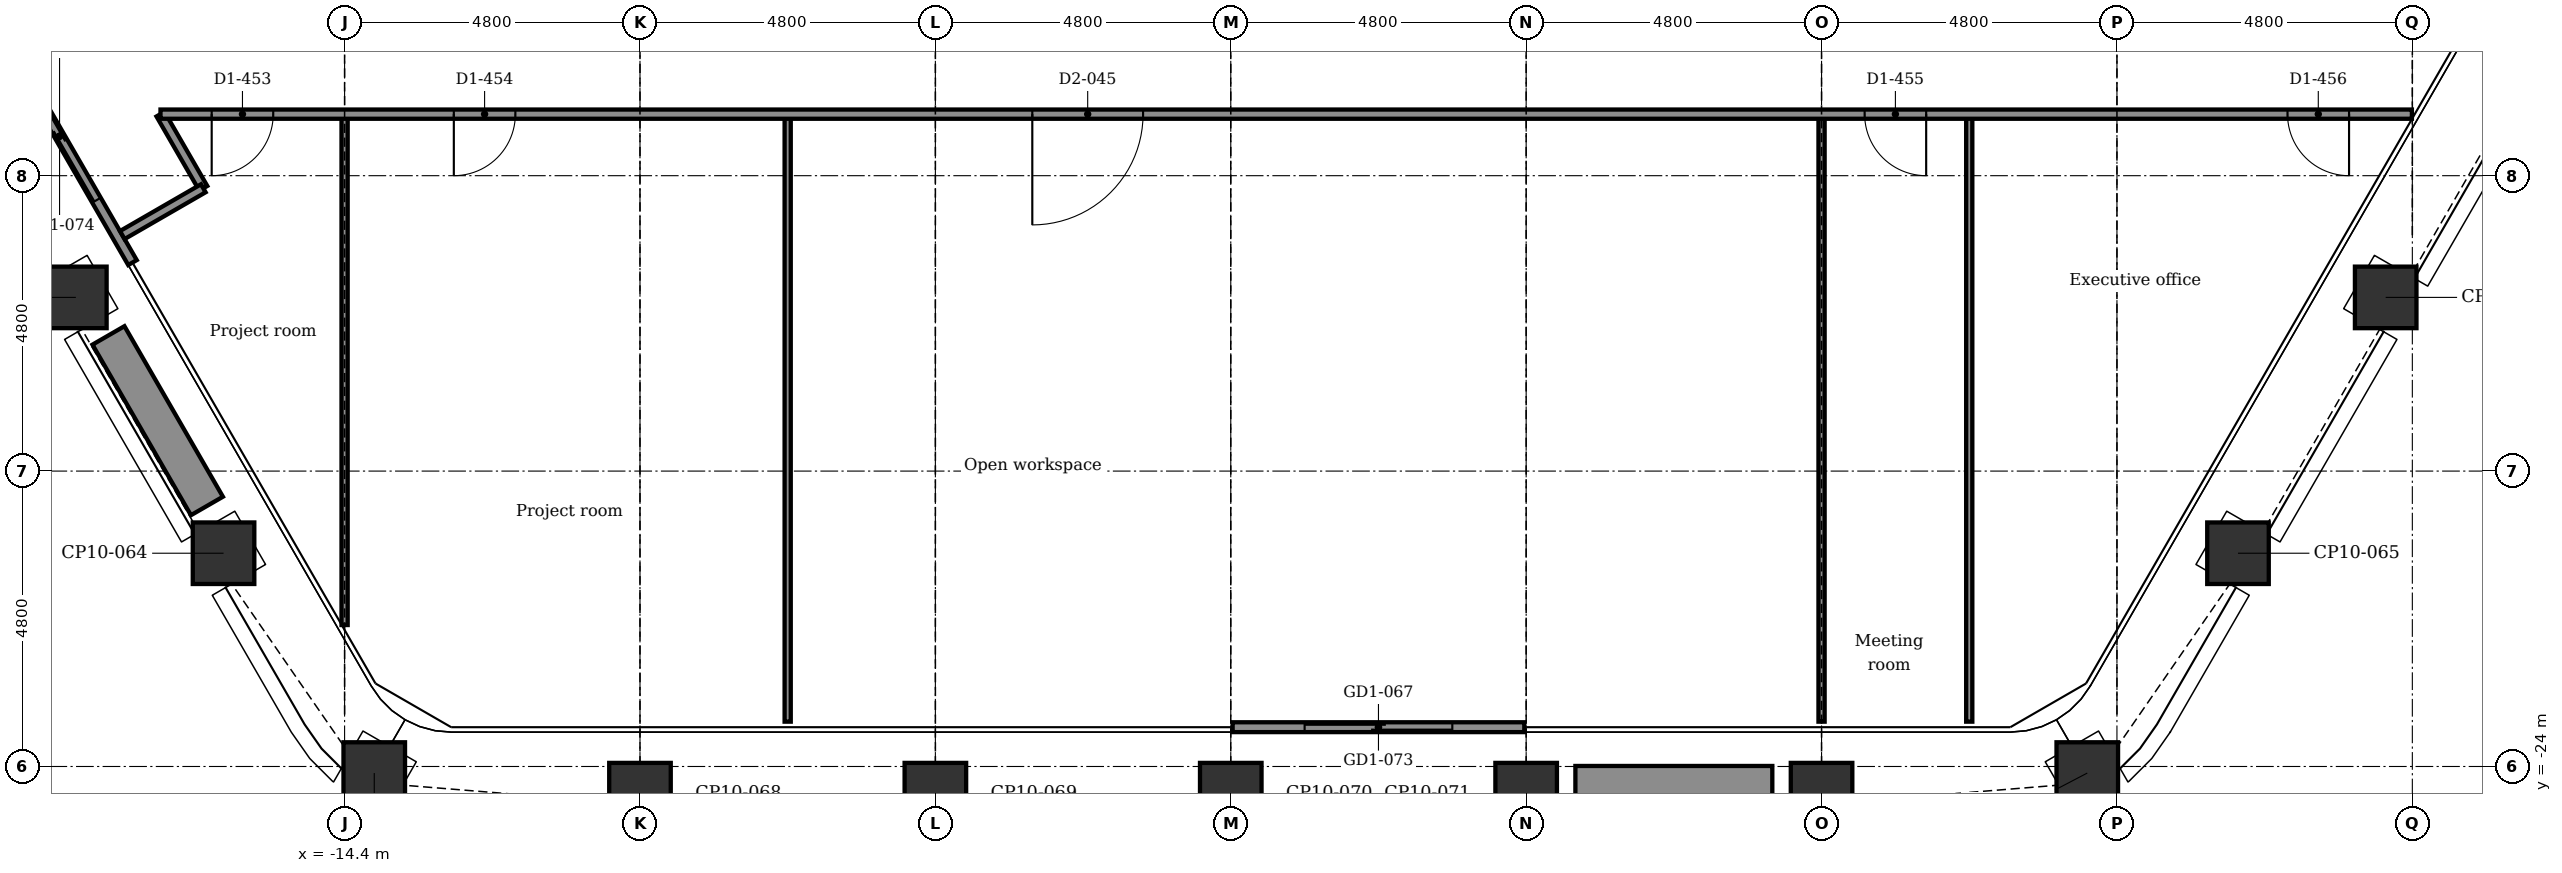
"""IFC4 building model, lengths in metres.
Left out: names, types, materials, properties, quantities, classifications, styles, units other than length and angle.
Written with IfcOpenShell. Run it as: python <this file> out.ifc"""

import sys

from ifc_helpers import new_model, si_unit, direction, frame, frame_2d, origin, origin_2d, place, context, subcontext, project, spatial, rectangle, extrude, element, fill, save


model = new_model("IFC4")
c1 = context("Model", 3, precision=1e-05, world=origin(), true_north=direction((0.0, 1.0)))
c2 = subcontext(c1, "Body", "Model", "MODEL_VIEW")
j1 = project(units=[si_unit("LENGTHUNIT", "METRE"), si_unit("PLANEANGLEUNIT", "RADIAN")], contexts=[c1])
p1 = place(None, origin())
s1 = spatial("IfcSite", under=j1, at=p1, CompositionType="ELEMENT")
p2 = place(p1, origin())
s2 = spatial("IfcBuilding", under=s1, at=p2, CompositionType="ELEMENT")
p3 = place(p2, frame((0.0, 0.0, 154.4)))
s3 = spatial("IfcBuildingStorey", under=s2, at=p3, CompositionType="ELEMENT", Elevation=154.4)
for number, where, z_axis, x_axis in (
    (1, (18.767, -16.378, -0.15), (0.0, 0.0, 1.0), (0.5, 0.866, 0.0)),
    (2, (16.367, -20.535, -0.15), (0.0, 0.0, 1.0), (0.5, 0.866, 0.0)),
    (3, (13.918, -24.107, -0.15), (0.0, 0.0, 1.0), (0.866, 0.5, 0.0)),
    (4, (9.6, -24.442, -0.15), (0.0, 0.0, 1.0), (1.0, 0.0, 0.0)),
    (5, (4.8, -24.442, -0.15), (0.0, 0.0, 1.0), (1.0, 0.0, 0.0)),
    (6, (0.0, -24.442, -0.15), (0.0, 0.0, 1.0), (1.0, 0.0, 0.0)),
    (7, (-4.8, -24.442, -0.15), (0.0, 0.0, 1.0), (1.0, 0.0, 0.0)),
    (8, (-9.6, -24.442, -0.15), (0.0, 0.0, 1.0), (1.0, 0.0, 0.0)),
    (9, (-13.918, -24.107, -0.15), (0.0, 0.0, 1.0), (0.5, 0.866, 0.0)),
    (10, (-16.367, -20.535, -0.15), (0.0, 0.0, 1.0), (0.866, 0.5, 0.0)),
    (11, (-18.767, -16.378, -0.15), (0.0, 0.0, 1.0), (0.866, 0.5, 0.0)),
):
    element("IfcColumn", number, at=place(p3, frame(where, z_axis=z_axis, x_axis=x_axis)), inside=s3, PredefinedType="COLUMN", context=c2, shape_type="SweptSolid", body=[
        extrude(rectangle(XDim=1.0, YDim=1.0, at=origin_2d()), origin(), (0.0, 0.0, 1.0), 3.9),
    ])
p4 = place(p3, frame((4.77, -23.362, 0.0), z_axis=(0.0, 0.0, 1.0), x_axis=(-1.0, 0.0, 0.0)))
e12 = element("IfcWall", 12, at=p4, inside=s3, PredefinedType="PARTITIONING", context=c2, shape_type="SweptSolid", body=[
    extrude(rectangle(XDim=4.74, YDim=0.16, at=frame_2d((2.37, 0.0))), origin(), (0.0, 0.0, 1.0), 3.75),
])
p5 = place(p4, frame((1.17, 0.0, 0.0)))
e13 = element("IfcOpeningElement", 13, at=p5, cuts=e12, PredefinedType="OPENING", context=c2, shape_type="SweptSolid", body=[
    extrude(rectangle(XDim=2.4, YDim=2.4, at=frame_2d((1.2, 1.2))), frame((0.0, 0.09, 0.0), z_axis=(0.0, -1.0, 0.0), x_axis=(1.0, 0.0, 0.0)), (0.0, 0.0, 1.0), 0.18),
])
p6 = place(p3, frame((-17.847, -15.812, 0.0), z_axis=(0.0, 0.0, 1.0), x_axis=(-0.5000167099, 0.866015756104, 0.0)))
e14 = element("IfcWall", 14, at=p6, inside=s3, PredefinedType="PARTITIONING", context=c2, shape_type="SweptSolid", body=[
    extrude(rectangle(XDim=4.74, YDim=0.16, at=frame_2d((2.37, 0.0))), origin(), (0.0, 0.0, 1.0), 3.75),
])
p7 = place(p6, frame((1.17, 0.0, 0.0)))
e15 = element("IfcOpeningElement", 15, at=p7, cuts=e14, PredefinedType="OPENING", context=c2, shape_type="SweptSolid", body=[
    extrude(rectangle(XDim=2.4, YDim=2.4, at=frame_2d((1.2, 1.2))), frame((0.0, 0.09, 0.0), z_axis=(0.0, -1.0, 0.0), x_axis=(1.0, 0.0, 0.0)), (0.0, 0.0, 1.0), 0.18),
])
for number, where, z_axis, x_axis in (
    (16, (8.8, -24.292, 0.0), (0.0, 0.0, 1.0), (-1.0, 0.0, 0.0)),
    (17, (-16.637, -19.767, 0.0), (0.0, 0.0, 1.0), (-0.5, 0.866, 0.0)),
):
    element("IfcWall", number, at=place(p3, frame(where, z_axis=z_axis, x_axis=x_axis)), inside=s3, PredefinedType="USERDEFINED", context=c2, shape_type="SweptSolid", body=[
        extrude(rectangle(XDim=3.2, YDim=0.6, at=frame_2d((1.6, 0.0))), origin(), (0.0, 0.0, 1.0), 0.7),
    ])
p8 = place(p3, frame((12.0, -23.271, 0.0), z_axis=(0.0, 0.0, 1.0), x_axis=(0.0, 1.0, 0.0)))
e18 = element("IfcWall", 18, at=p8, inside=s3, PredefinedType="PARTITIONING", context=c2, shape_type="SweptSolid", body=[
    extrude(rectangle(XDim=9.872, YDim=0.1, at=frame_2d((4.936, 0.0))), origin(), (0.0, 0.0, 1.0), 3.75),
])
p9 = place(p3, frame((9.6, -23.271, 0.0), z_axis=(0.0, 0.0, 1.0), x_axis=(0.0, 1.0, 0.0)))
e19 = element("IfcWall", 19, at=p9, inside=s3, PredefinedType="PARTITIONING", context=c2, shape_type="SweptSolid", body=[
    extrude(rectangle(XDim=9.872, YDim=0.1, at=frame_2d((4.936, 0.0))), origin(), (0.0, 0.0, 1.0), 3.066),
])
p10 = place(p3, frame((-7.2, -23.271, 0.0), z_axis=(0.0, 0.0, 1.0), x_axis=(0.0, 1.0, 0.0)))
e20 = element("IfcWall", 20, at=p10, inside=s3, PredefinedType="PARTITIONING", context=c2, shape_type="SweptSolid", body=[
    extrude(rectangle(XDim=9.872, YDim=0.1, at=frame_2d((4.936, 0.0))), origin(), (0.0, 0.0, 1.0), 3.75),
])
p11 = place(p3, frame((-14.4, -21.701, 0.0), z_axis=(0.0, 0.0, 1.0), x_axis=(0.0, 1.0, 0.0)))
e21 = element("IfcWall", 21, at=p11, inside=s3, PredefinedType="PARTITIONING", context=c2, shape_type="SweptSolid", body=[
    extrude(rectangle(XDim=8.302, YDim=0.1, at=frame_2d((4.151, 0.0))), origin(), (0.0, 0.0, 1.0), 3.066),
])
p12 = place(p3, frame((-17.392, -13.4, 0.0), z_axis=(0.0, 0.0, 1.0), x_axis=(0.4999705729, -0.866042392862, 0.0)))
e22 = element("IfcWall", 22, at=p12, inside=s3, PredefinedType="PARTITIONING", context=c2, shape_type="SweptSolid", body=[
    extrude(rectangle(XDim=1.391, YDim=0.15, at=frame_2d((0.696, 0.0))), origin(), (0.0, 0.0, 1.0), 3.75),
])
p13 = place(p3, frame((-18.012, -15.365, 0.0), z_axis=(0.0, 0.0, 1.0), x_axis=(0.866030456496, 0.499991248344, 0.0)))
e23 = element("IfcWall", 23, at=p13, inside=s3, PredefinedType="PARTITIONING", context=c2, shape_type="SweptSolid", body=[
    extrude(rectangle(XDim=1.52, YDim=0.15, at=frame_2d((0.76, 0.0))), origin(), (0.0, 0.0, 1.0), 3.75),
])
p14 = place(p3, frame((-17.392, -13.4, 0.0), z_axis=(0.0, 0.0, 1.0), x_axis=(1.0, 0.0, 0.0)))
e24 = element("IfcWall", 24, at=p14, inside=s3, PredefinedType="PARTITIONING", context=c2, shape_type="SweptSolid", body=[
    extrude(rectangle(XDim=36.584, YDim=0.15, at=frame_2d((18.292, 0.0))), origin(), (0.0, 0.0, 1.0), 3.75),
])
p15 = place(p14, frame((0.832, 0.0, 0.0)))
e25 = element("IfcOpeningElement", 25, at=p15, cuts=e24, PredefinedType="OPENING", context=c2, shape_type="SweptSolid", body=[
    extrude(rectangle(XDim=1.0, YDim=2.1, at=frame_2d((0.5, 1.05))), frame((0.0, 0.085, 0.0), z_axis=(0.0, -1.0, 0.0), x_axis=(1.0, 0.0, 0.0)), (0.0, 0.0, 1.0), 0.17),
])
p16 = place(p14, frame((4.767, 0.0, 0.0)))
e26 = element("IfcOpeningElement", 26, at=p16, cuts=e24, PredefinedType="OPENING", context=c2, shape_type="SweptSolid", body=[
    extrude(rectangle(XDim=1.0, YDim=2.1, at=frame_2d((0.5, 1.05))), frame((0.0, 0.085, 0.0), z_axis=(0.0, -1.0, 0.0), x_axis=(1.0, 0.0, 0.0)), (0.0, 0.0, 1.0), 0.17),
])
p17 = place(p14, frame((14.167, 0.0, 0.0)))
e27 = element("IfcOpeningElement", 27, at=p17, cuts=e24, PredefinedType="OPENING", context=c2, shape_type="SweptSolid", body=[
    extrude(rectangle(XDim=1.8, YDim=2.1, at=frame_2d((0.9, 1.05))), frame((0.0, 0.085, 0.0), z_axis=(0.0, -1.0, 0.0), x_axis=(1.0, 0.0, 0.0)), (0.0, 0.0, 1.0), 0.17),
])
p18 = place(p14, frame((27.692, 0.0, 0.0)))
e28 = element("IfcOpeningElement", 28, at=p18, cuts=e24, PredefinedType="OPENING", context=c2, shape_type="SweptSolid", body=[
    extrude(rectangle(XDim=1.0, YDim=2.1, at=frame_2d((0.5, 1.05))), frame((0.0, 0.085, 0.0), z_axis=(0.0, -1.0, 0.0), x_axis=(1.0, 0.0, 0.0)), (0.0, 0.0, 1.0), 0.17),
])
p19 = place(p14, frame((34.563, 0.0, 0.0)))
e29 = element("IfcOpeningElement", 29, at=p19, cuts=e24, PredefinedType="OPENING", context=c2, shape_type="SweptSolid", body=[
    extrude(rectangle(XDim=1.0, YDim=2.1, at=frame_2d((0.5, 1.05))), frame((0.0, 0.085, 0.0), z_axis=(0.0, -1.0, 0.0), x_axis=(1.0, 0.0, 0.0)), (0.0, 0.0, 1.0), 0.17),
])
p20 = place(p5, origin())
e30 = element("IfcDoor", 30, at=p20, inside=s3, OperationType="DOUBLE_DOOR_SLIDING", PredefinedType="DOOR", context=c2, shape_type="SweptSolid", body=[
    extrude(rectangle(XDim=2.4, YDim=2.4, at=frame_2d((1.2, 1.2))), frame((0.0, 0.025, 0.0), z_axis=(0.0, -1.0, 0.0), x_axis=(1.0, 0.0, 0.0)), (0.0, 0.0, 1.0), 0.05),
])
fill(e13, e30)
p21 = place(p7, origin())
e31 = element("IfcDoor", 31, at=p21, inside=s3, OperationType="DOUBLE_DOOR_SLIDING", PredefinedType="DOOR", context=c2, shape_type="SweptSolid", body=[
    extrude(rectangle(XDim=2.4, YDim=2.4, at=frame_2d((1.2, 1.2))), frame((0.0, 0.025, 0.0), z_axis=(0.0, -1.0, 0.0), x_axis=(1.0, 0.0, 0.0)), (0.0, 0.0, 1.0), 0.05),
])
fill(e15, e31)
p22 = place(p15, frame((1.0, 0.0, 0.0), z_axis=(0.0, 0.0, 1.0), x_axis=(-1.0, 0.0, 0.0)))
e32 = element("IfcDoor", 32, at=p22, inside=s3, OperationType="SINGLE_SWING_LEFT", PredefinedType="DOOR", context=c2, shape_type="SweptSolid", body=[
    extrude(rectangle(XDim=1.0, YDim=2.1, at=frame_2d((0.5, 1.05))), frame((0.0, 0.025, 0.0), z_axis=(0.0, -1.0, 0.0), x_axis=(1.0, 0.0, 0.0)), (0.0, 0.0, 1.0), 0.05),
])
fill(e25, e32)
p23 = place(p16, frame((1.0, 0.0, 0.0), z_axis=(0.0, 0.0, 1.0), x_axis=(-1.0, 0.0, 0.0)))
e33 = element("IfcDoor", 33, at=p23, inside=s3, OperationType="SINGLE_SWING_LEFT", PredefinedType="DOOR", context=c2, shape_type="SweptSolid", body=[
    extrude(rectangle(XDim=1.0, YDim=2.1, at=frame_2d((0.5, 1.05))), frame((0.0, 0.025, 0.0), z_axis=(0.0, -1.0, 0.0), x_axis=(1.0, 0.0, 0.0)), (0.0, 0.0, 1.0), 0.05),
])
fill(e26, e33)
p24 = place(p17, frame((1.8, 0.0, 0.0), z_axis=(0.0, 0.0, 1.0), x_axis=(-1.0, 0.0, 0.0)))
e34 = element("IfcDoor", 34, at=p24, inside=s3, OperationType="SINGLE_SWING_LEFT", PredefinedType="DOOR", context=c2, shape_type="SweptSolid", body=[
    extrude(rectangle(XDim=1.8, YDim=2.1, at=frame_2d((0.9, 1.05))), frame((0.0, 0.025, 0.0), z_axis=(0.0, -1.0, 0.0), x_axis=(1.0, 0.0, 0.0)), (0.0, 0.0, 1.0), 0.05),
])
fill(e27, e34)
p25 = place(p18, frame((1.0, 0.0, 0.0), z_axis=(0.0, 0.0, 1.0), x_axis=(-1.0, 0.0, 0.0)))
e35 = element("IfcDoor", 35, at=p25, inside=s3, OperationType="SINGLE_SWING_RIGHT", PredefinedType="DOOR", context=c2, shape_type="SweptSolid", body=[
    extrude(rectangle(XDim=1.0, YDim=2.1, at=frame_2d((0.5, 1.05))), frame((0.0, 0.025, 0.0), z_axis=(0.0, -1.0, 0.0), x_axis=(1.0, 0.0, 0.0)), (0.0, 0.0, 1.0), 0.05),
])
fill(e28, e35)
p26 = place(p19, frame((1.0, 0.0, 0.0), z_axis=(0.0, 0.0, 1.0), x_axis=(-1.0, 0.0, 0.0)))
e36 = element("IfcDoor", 36, at=p26, inside=s3, OperationType="SINGLE_SWING_RIGHT", PredefinedType="DOOR", context=c2, shape_type="SweptSolid", body=[
    extrude(rectangle(XDim=1.0, YDim=2.1, at=frame_2d((0.5, 1.05))), frame((0.0, 0.025, 0.0), z_axis=(0.0, -1.0, 0.0), x_axis=(1.0, 0.0, 0.0)), (0.0, 0.0, 1.0), 0.05),
])
fill(e29, e36)
save(model, sys.argv[1])
